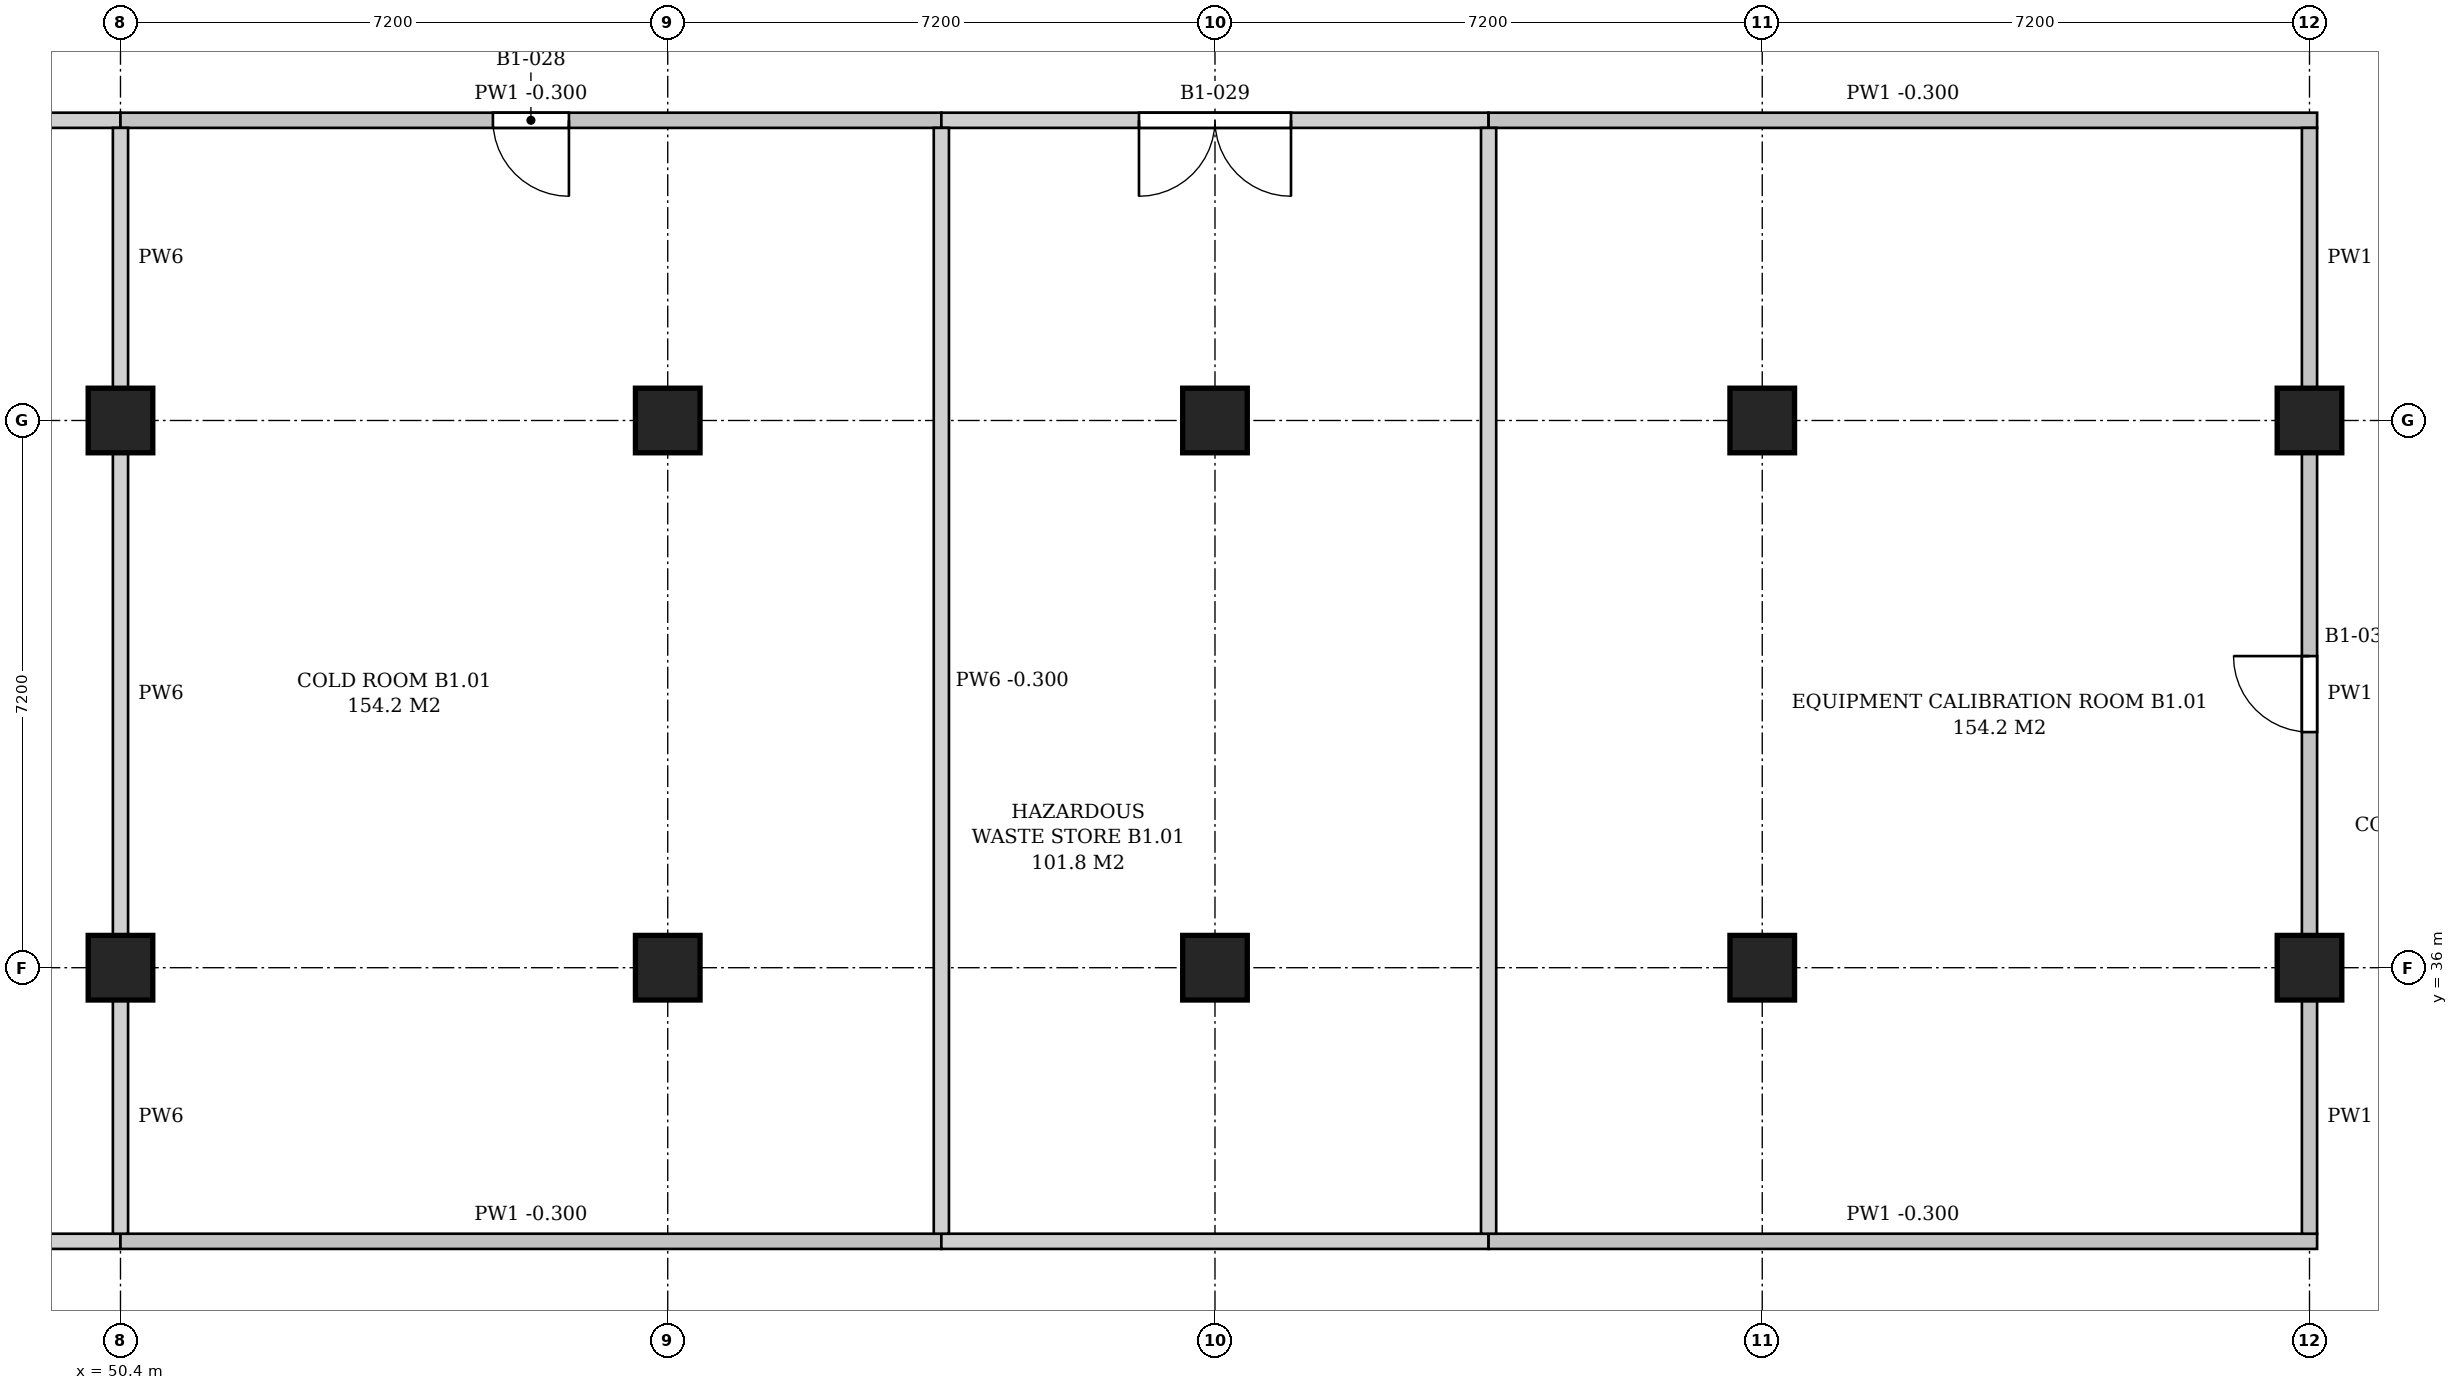
"""IFC4 building model, lengths in metres.
Left out: names, types, materials, properties, quantities, classifications, styles, units other than length and angle.
Written with IfcOpenShell. Run it as: python <this file> out.ifc"""

import sys

from ifc_helpers import new_model, si_unit, direction, frame, frame_2d, origin, origin_2d, place, context, subcontext, project, spatial, polyline, rectangle, outline, extrude, element, fill, save


model = new_model("IFC4")
c1 = context("Model", 3, precision=1e-05, world=origin(), true_north=direction((0.0, 1.0)))
c2 = subcontext(c1, "Body", "Model", "MODEL_VIEW")
j1 = project(units=[si_unit("LENGTHUNIT", "METRE"), si_unit("PLANEANGLEUNIT", "RADIAN")], contexts=[c1])
p1 = place(None, origin())
s1 = spatial("IfcSite", under=j1, at=p1, CompositionType="ELEMENT")
p2 = place(p1, origin())
s2 = spatial("IfcBuilding", under=s1, at=p2, CompositionType="ELEMENT")
p3 = place(p2, frame((0.0, 0.0, -4.5)))
s3 = spatial("IfcBuildingStorey", under=s2, at=p3, CompositionType="ELEMENT", Elevation=-4.5)
for number, where, z_axis, x_axis in (
    (1, (50.4, 36.0, 0.0), (0.0, 0.0, 1.0), (1.0, 0.0, 0.0)),
    (2, (50.4, 43.2, 0.0), (0.0, 0.0, 1.0), (1.0, 0.0, 0.0)),
    (3, (57.6, 36.0, 0.0), (0.0, 0.0, 1.0), (1.0, 0.0, 0.0)),
    (4, (57.6, 43.2, 0.0), (0.0, 0.0, 1.0), (1.0, 0.0, 0.0)),
    (5, (64.8, 36.0, 0.0), (0.0, 0.0, 1.0), (1.0, 0.0, 0.0)),
    (6, (64.8, 43.2, 0.0), (0.0, 0.0, 1.0), (1.0, 0.0, 0.0)),
    (7, (72.0, 36.0, 0.0), (0.0, 0.0, 1.0), (1.0, 0.0, 0.0)),
    (8, (72.0, 43.2, 0.0), (0.0, 0.0, 1.0), (1.0, 0.0, 0.0)),
    (9, (79.2, 36.0, 0.0), (0.0, 0.0, 1.0), (1.0, 0.0, 0.0)),
    (10, (79.2, 43.2, 0.0), (0.0, 0.0, 1.0), (1.0, 0.0, 0.0)),
):
    element("IfcColumn", number, at=place(p3, frame(where, z_axis=z_axis, x_axis=x_axis)), inside=s3, PredefinedType="COLUMN", context=c2, shape_type="SweptSolid", body=[
        extrude(rectangle(XDim=0.85, YDim=0.85, at=origin_2d()), origin(), (0.0, 0.0, 1.0), 4.5),
    ])
p4 = place(p3, frame((39.5, 32.4, 0.0), z_axis=(0.0, 0.0, 1.0), x_axis=(1.0, 0.0, 0.0)))
e11 = element("IfcWall", 11, at=p4, inside=s3, PredefinedType="PARTITIONING", context=c2, shape_type="SweptSolid", body=[
    extrude(outline(polyline([(0.0, 0.0), (10.9, 0.0), (10.9, 3.4), (10.6, 3.4), (10.6, 4.2), (4.0, 4.2), (4.0, 3.4), (3.4, 3.4), (3.4, 4.2), (0.0, 4.2), (0.0, 0.0)])), frame((0.0, 0.1, 0.0), z_axis=(0.0, -1.0, 0.0), x_axis=(1.0, 0.0, 0.0)), (0.0, 0.0, 1.0), 0.2),
])
p5 = place(p3, frame((50.4, 32.4, 0.0), z_axis=(0.0, 0.0, 1.0), x_axis=(1.0, 0.0, 0.0)))
e12 = element("IfcWall", 12, at=p5, inside=s3, PredefinedType="PARTITIONING", context=c2, shape_type="SweptSolid", body=[
    extrude(outline(polyline([(0.0, 0.0), (10.8, 0.0), (10.8, 4.2), (7.5, 4.2), (7.5, 3.4), (6.9, 3.4), (6.9, 4.2), (0.3, 4.2), (0.3, 3.4), (0.0, 3.4), (0.0, 0.0)])), frame((0.0, 0.1, 0.0), z_axis=(0.0, -1.0, 0.0), x_axis=(1.0, 0.0, 0.0)), (0.0, 0.0, 1.0), 0.2),
])
p6 = place(p3, frame((61.2, 32.4, 0.0), z_axis=(0.0, 0.0, 1.0), x_axis=(1.0, 0.0, 0.0)))
e13 = element("IfcWall", 13, at=p6, inside=s3, PredefinedType="PARTITIONING", context=c2, shape_type="SweptSolid", body=[
    extrude(outline(polyline([(0.0, 0.0), (7.2, 0.0), (7.2, 4.2), (3.9, 4.2), (3.9, 3.4), (3.3, 3.4), (3.3, 4.2), (0.0, 4.2), (0.0, 0.0)])), frame((0.0, 0.1, 0.0), z_axis=(0.0, -1.0, 0.0), x_axis=(1.0, 0.0, 0.0)), (0.0, 0.0, 1.0), 0.2),
])
p7 = place(p3, frame((68.4, 32.4, 0.0), z_axis=(0.0, 0.0, 1.0), x_axis=(1.0, 0.0, 0.0)))
e14 = element("IfcWall", 14, at=p7, inside=s3, PredefinedType="PARTITIONING", context=c2, shape_type="SweptSolid", body=[
    extrude(outline(polyline([(0.0, 0.0), (10.9, 0.0), (10.9, 3.4), (10.5, 3.4), (10.5, 4.2), (3.9, 4.2), (3.9, 3.4), (3.3, 3.4), (3.3, 4.2), (0.0, 4.2), (0.0, 0.0)])), frame((0.0, 0.1, 0.0), z_axis=(0.0, -1.0, 0.0), x_axis=(1.0, 0.0, 0.0)), (0.0, 0.0, 1.0), 0.2),
])
p8 = place(p3, frame((39.5, 47.15, 0.0), z_axis=(0.0, 0.0, 1.0), x_axis=(1.0, 0.0, 0.0)))
e15 = element("IfcWall", 15, at=p8, inside=s3, PredefinedType="PARTITIONING", context=c2, shape_type="SweptSolid", body=[
    extrude(outline(polyline([(0.0, 0.0), (10.9, 0.0), (10.9, 3.4), (10.6, 3.4), (10.6, 4.2), (4.0, 4.2), (4.0, 3.4), (3.4, 3.4), (3.4, 4.2), (0.0, 4.2), (0.0, 0.0)])), frame((0.0, 0.1, 0.0), z_axis=(0.0, -1.0, 0.0), x_axis=(1.0, 0.0, 0.0)), (0.0, 0.0, 1.0), 0.2),
])
p9 = place(p3, frame((50.4, 47.15, 0.0), z_axis=(0.0, 0.0, 1.0), x_axis=(1.0, 0.0, 0.0)))
e16 = element("IfcWall", 16, at=p9, inside=s3, PredefinedType="PARTITIONING", context=c2, shape_type="SweptSolid", body=[
    extrude(outline(polyline([(0.0, 0.0), (10.8, 0.0), (10.8, 4.2), (7.5, 4.2), (7.5, 3.4), (6.9, 3.4), (6.9, 4.2), (0.3, 4.2), (0.3, 3.4), (0.0, 3.4), (0.0, 0.0)])), frame((0.0, 0.1, 0.0), z_axis=(0.0, -1.0, 0.0), x_axis=(1.0, 0.0, 0.0)), (0.0, 0.0, 1.0), 0.2),
])
p10 = place(p9, frame((4.9, 0.0, 0.0)))
e17 = element("IfcOpeningElement", 17, at=p10, cuts=e16, PredefinedType="OPENING", context=c2, shape_type="SweptSolid", body=[
    extrude(rectangle(XDim=1.0, YDim=2.1, at=frame_2d((0.5, 1.05))), frame((0.0, 0.11, 0.0), z_axis=(0.0, -1.0, 0.0), x_axis=(1.0, 0.0, 0.0)), (0.0, 0.0, 1.0), 0.22),
])
p11 = place(p3, frame((61.2, 47.15, 0.0), z_axis=(0.0, 0.0, 1.0), x_axis=(1.0, 0.0, 0.0)))
e18 = element("IfcWall", 18, at=p11, inside=s3, PredefinedType="PARTITIONING", context=c2, shape_type="SweptSolid", body=[
    extrude(outline(polyline([(0.0, 0.0), (7.2, 0.0), (7.2, 4.2), (3.9, 4.2), (3.9, 3.4), (3.3, 3.4), (3.3, 4.2), (0.0, 4.2), (0.0, 0.0)])), frame((0.0, 0.1, 0.0), z_axis=(0.0, -1.0, 0.0), x_axis=(1.0, 0.0, 0.0)), (0.0, 0.0, 1.0), 0.2),
])
p12 = place(p11, frame((2.6, 0.0, 0.0)))
e19 = element("IfcOpeningElement", 19, at=p12, cuts=e18, PredefinedType="OPENING", context=c2, shape_type="SweptSolid", body=[
    extrude(rectangle(XDim=2.0, YDim=2.1, at=frame_2d((1.0, 1.05))), frame((0.0, 0.11, 0.0), z_axis=(0.0, -1.0, 0.0), x_axis=(1.0, 0.0, 0.0)), (0.0, 0.0, 1.0), 0.22),
])
p13 = place(p3, frame((68.4, 47.15, 0.0), z_axis=(0.0, 0.0, 1.0), x_axis=(1.0, 0.0, 0.0)))
e20 = element("IfcWall", 20, at=p13, inside=s3, PredefinedType="PARTITIONING", context=c2, shape_type="SweptSolid", body=[
    extrude(outline(polyline([(0.0, 0.0), (10.9, 0.0), (10.9, 3.4), (10.5, 3.4), (10.5, 4.2), (3.9, 4.2), (3.9, 3.4), (3.3, 3.4), (3.3, 4.2), (0.0, 4.2), (0.0, 0.0)])), frame((0.0, 0.1, 0.0), z_axis=(0.0, -1.0, 0.0), x_axis=(1.0, 0.0, 0.0)), (0.0, 0.0, 1.0), 0.2),
])
p14 = place(p3, frame((50.4, 32.5, 0.0), z_axis=(0.0, 0.0, 1.0), x_axis=(0.0, 1.0, 0.0)))
e21 = element("IfcWall", 21, at=p14, inside=s3, PredefinedType="PARTITIONING", context=c2, shape_type="SweptSolid", body=[
    extrude(rectangle(XDim=3.075, YDim=0.2, at=frame_2d((1.538, 0.0))), origin(), (0.0, 0.0, 1.0), 3.4),
])
p15 = place(p3, frame((50.4, 36.425, 0.0), z_axis=(0.0, 0.0, 1.0), x_axis=(0.0, 1.0, 0.0)))
e22 = element("IfcWall", 22, at=p15, inside=s3, PredefinedType="PARTITIONING", context=c2, shape_type="SweptSolid", body=[
    extrude(rectangle(XDim=6.35, YDim=0.2, at=frame_2d((3.175, 0.0))), origin(), (0.0, 0.0, 1.0), 3.4),
])
p16 = place(p3, frame((50.4, 43.625, 0.0), z_axis=(0.0, 0.0, 1.0), x_axis=(0.0, 1.0, 0.0)))
e23 = element("IfcWall", 23, at=p16, inside=s3, PredefinedType="PARTITIONING", context=c2, shape_type="SweptSolid", body=[
    extrude(rectangle(XDim=3.425, YDim=0.2, at=frame_2d((1.712, 0.0))), origin(), (0.0, 0.0, 1.0), 3.4),
])
for number, where, z_axis, x_axis in (
    (24, (61.2, 32.5, 0.0), (0.0, 0.0, 1.0), (0.0, 1.0, 0.0)),
    (25, (68.4, 32.5, 0.0), (0.0, 0.0, 1.0), (0.0, 1.0, 0.0)),
):
    element("IfcWall", number, at=place(p3, frame(where, z_axis=z_axis, x_axis=x_axis)), inside=s3, PredefinedType="PARTITIONING", context=c2, shape_type="SweptSolid", body=[
        extrude(outline(polyline([(0.0, 0.0), (14.55, 0.0), (14.55, 4.2), (11.0, 4.2), (11.0, 3.4), (10.4, 3.4), (10.4, 4.2), (3.8, 4.2), (3.8, 3.4), (3.2, 3.4), (3.2, 4.2), (0.0, 4.2), (0.0, 0.0)])), frame((0.0, 0.1, 0.0), z_axis=(0.0, -1.0, 0.0), x_axis=(1.0, 0.0, 0.0)), (0.0, 0.0, 1.0), 0.2),
    ])
p17 = place(p3, frame((79.2, 32.5, 0.0), z_axis=(0.0, 0.0, 1.0), x_axis=(0.0, 1.0, 0.0)))
e26 = element("IfcWall", 26, at=p17, inside=s3, PredefinedType="PARTITIONING", context=c2, shape_type="SweptSolid", body=[
    extrude(rectangle(XDim=3.075, YDim=0.2, at=frame_2d((1.538, 0.0))), origin(), (0.0, 0.0, 1.0), 3.4),
])
p18 = place(p3, frame((79.2, 36.425, 0.0), z_axis=(0.0, 0.0, 1.0), x_axis=(0.0, 1.0, 0.0)))
e27 = element("IfcWall", 27, at=p18, inside=s3, PredefinedType="PARTITIONING", context=c2, shape_type="SweptSolid", body=[
    extrude(rectangle(XDim=6.35, YDim=0.2, at=frame_2d((3.175, 0.0))), origin(), (0.0, 0.0, 1.0), 3.4),
])
p19 = place(p18, frame((2.675, 0.0, 0.0)))
e28 = element("IfcOpeningElement", 28, at=p19, cuts=e27, PredefinedType="OPENING", context=c2, shape_type="SweptSolid", body=[
    extrude(rectangle(XDim=1.0, YDim=2.1, at=frame_2d((0.5, 1.05))), frame((0.0, 0.11, 0.0), z_axis=(0.0, -1.0, 0.0), x_axis=(1.0, 0.0, 0.0)), (0.0, 0.0, 1.0), 0.22),
])
p20 = place(p3, frame((79.2, 43.625, 0.0), z_axis=(0.0, 0.0, 1.0), x_axis=(0.0, 1.0, 0.0)))
e29 = element("IfcWall", 29, at=p20, inside=s3, PredefinedType="PARTITIONING", context=c2, shape_type="SweptSolid", body=[
    extrude(rectangle(XDim=3.425, YDim=0.2, at=frame_2d((1.712, 0.0))), origin(), (0.0, 0.0, 1.0), 3.4),
])
p21 = place(p10, frame((1.0, 0.0, 0.0), z_axis=(0.0, 0.0, 1.0), x_axis=(-1.0, 0.0, 0.0)))
e30 = element("IfcDoor", 30, at=p21, inside=s3, OperationType="SINGLE_SWING_LEFT", PredefinedType="DOOR", context=c2, shape_type="SweptSolid", body=[
    extrude(rectangle(XDim=1.0, YDim=2.1, at=frame_2d((0.5, 1.05))), frame((0.0, 0.025, 0.0), z_axis=(0.0, -1.0, 0.0), x_axis=(1.0, 0.0, 0.0)), (0.0, 0.0, 1.0), 0.05),
])
fill(e17, e30)
p22 = place(p12, origin())
e31 = element("IfcDoor", 31, at=p22, inside=s3, OperationType="DOUBLE_DOOR_SINGLE_SWING", PredefinedType="DOOR", context=c2, shape_type="SweptSolid", body=[
    extrude(rectangle(XDim=2.0, YDim=2.1, at=frame_2d((1.0, 1.05))), frame((0.0, 0.025, 0.0), z_axis=(0.0, -1.0, 0.0), x_axis=(1.0, 0.0, 0.0)), (0.0, 0.0, 1.0), 0.05),
])
fill(e19, e31)
p23 = place(p19, origin())
e32 = element("IfcDoor", 32, at=p23, inside=s3, OperationType="SINGLE_SWING_RIGHT", PredefinedType="DOOR", context=c2, shape_type="SweptSolid", body=[
    extrude(rectangle(XDim=1.0, YDim=2.1, at=frame_2d((0.5, 1.05))), frame((0.0, 0.025, 0.0), z_axis=(0.0, -1.0, 0.0), x_axis=(1.0, 0.0, 0.0)), (0.0, 0.0, 1.0), 0.05),
])
fill(e28, e32)
save(model, sys.argv[1])
